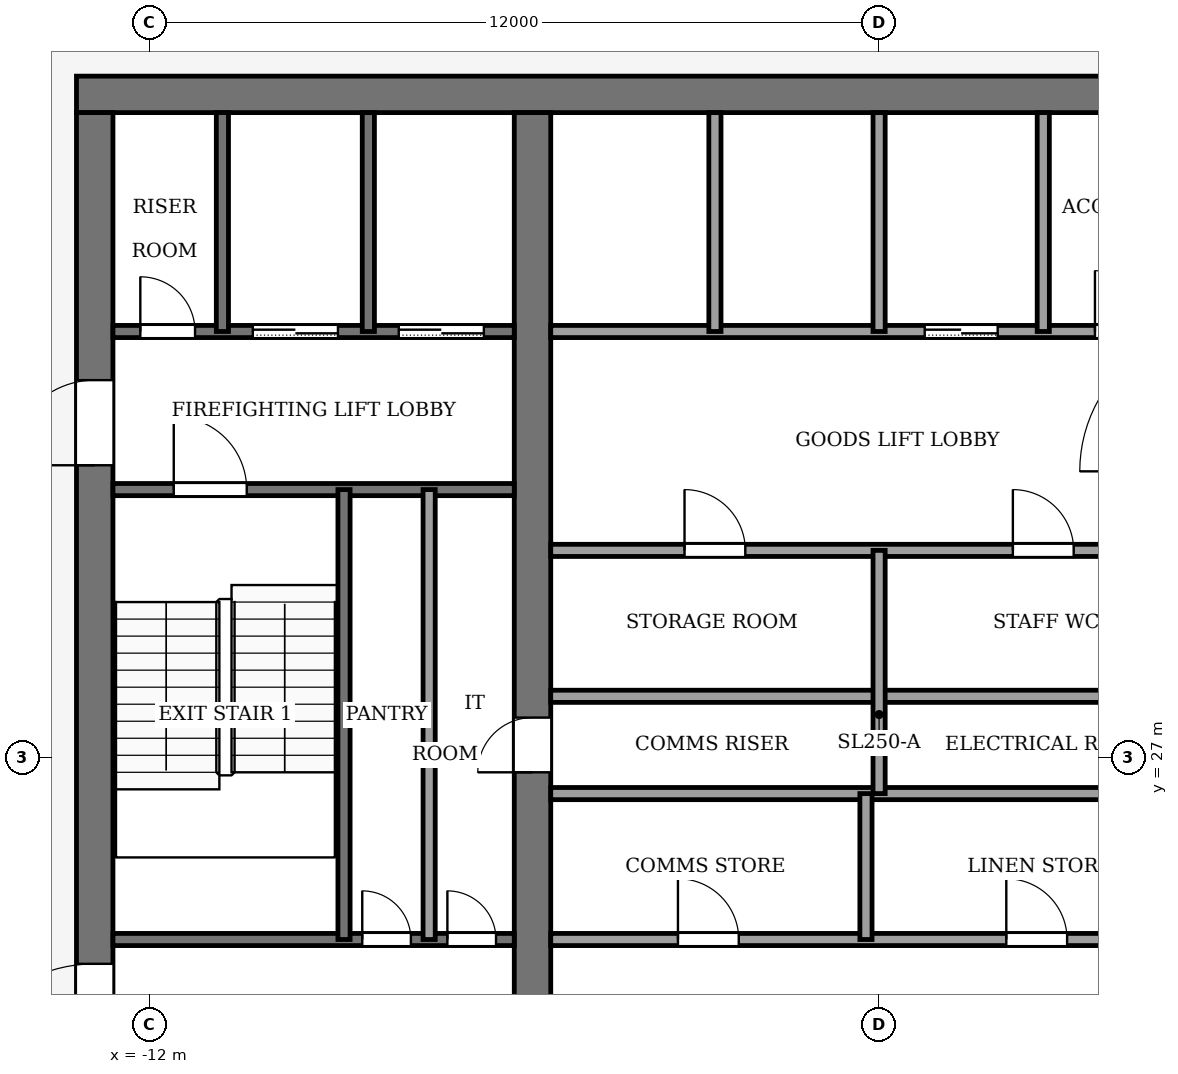
"""IFC4 building model, lengths in metres.
Left out: names, types, materials, properties, quantities, classifications, styles, units other than length and angle.
Written with IfcOpenShell. Run it as: python <this file> out.ifc"""

import sys

from ifc_helpers import new_model, si_unit, direction, frame, frame_2d, origin, place, context, subcontext, project, spatial, rectangle, extrude, element, fill, save


model = new_model("IFC4")
c1 = context("Model", 3, precision=1e-05, world=origin(), true_north=direction((0.0, 1.0)))
c2 = subcontext(c1, "Body", "Model", "MODEL_VIEW")
j1 = project(units=[si_unit("LENGTHUNIT", "METRE"), si_unit("PLANEANGLEUNIT", "RADIAN")], contexts=[c1])
p1 = place(None, origin())
s1 = spatial("IfcSite", under=j1, at=p1, CompositionType="ELEMENT")
p2 = place(p1, origin())
s2 = spatial("IfcBuilding", under=s1, at=p2, CompositionType="ELEMENT")
p3 = place(p2, frame((0.0, 0.0, 298.0)))
s3 = spatial("IfcBuildingStorey", under=s2, at=p3, CompositionType="ELEMENT", Elevation=298.0)
p4 = place(p3, frame((-13.2, 37.9, -0.13), z_axis=(0.0, 0.0, 1.0), x_axis=(1.0, 0.0, 0.0)))
e1 = element("IfcWall", 1, at=p4, inside=s3, PredefinedType="SHEAR", context=c2, shape_type="SweptSolid", body=[
    extrude(rectangle(XDim=26.4, YDim=0.6, at=frame_2d((13.2, 0.0))), origin(), (0.0, 0.0, 1.0), 4.0),
])
p5 = place(p3, frame((-12.9, 18.4, -0.13), z_axis=(0.0, 0.0, 1.0), x_axis=(0.0, 1.0, 0.0)))
e2 = element("IfcWall", 2, at=p5, inside=s3, PredefinedType="SHEAR", context=c2, shape_type="SweptSolid", body=[
    extrude(rectangle(XDim=19.2, YDim=0.6, at=frame_2d((9.6, 0.0))), origin(), (0.0, 0.0, 1.0), 4.0),
])
p6 = place(p5, frame((2.8, 0.0, 0.13)))
e3 = element("IfcOpeningElement", 3, at=p6, cuts=e2, PredefinedType="OPENING", context=c2, shape_type="SweptSolid", body=[
    extrude(rectangle(XDim=2.4, YDim=2.4, at=frame_2d((1.2, 1.2))), frame((0.0, 0.31, 0.0), z_axis=(0.0, -1.0, 0.0), x_axis=(1.0, 0.0, 0.0)), (0.0, 0.0, 1.0), 0.62),
])
p7 = place(p5, frame((13.4, 0.0, 0.13)))
e4 = element("IfcOpeningElement", 4, at=p7, cuts=e2, PredefinedType="OPENING", context=c2, shape_type="SweptSolid", body=[
    extrude(rectangle(XDim=1.4, YDim=2.2, at=frame_2d((0.7, 1.1))), frame((0.0, 0.31, 0.0), z_axis=(0.0, -1.0, 0.0), x_axis=(1.0, 0.0, 0.0)), (0.0, 0.0, 1.0), 0.62),
])
p8 = place(p3, frame((-5.7, 18.4, -0.13), z_axis=(0.0, 0.0, 1.0), x_axis=(0.0, 1.0, 0.0)))
e5 = element("IfcWall", 5, at=p8, inside=s3, PredefinedType="SHEAR", context=c2, shape_type="SweptSolid", body=[
    extrude(rectangle(XDim=19.2, YDim=0.6, at=frame_2d((9.6, 0.0))), origin(), (0.0, 0.0, 1.0), 4.0),
])
p9 = place(p8, frame((8.35, 0.0, 0.13)))
e6 = element("IfcOpeningElement", 6, at=p9, cuts=e5, PredefinedType="OPENING", context=c2, shape_type="SweptSolid", body=[
    extrude(rectangle(XDim=0.9, YDim=2.1, at=frame_2d((0.45, 1.05))), frame((0.0, 0.31, 0.0), z_axis=(0.0, -1.0, 0.0), x_axis=(1.0, 0.0, 0.0)), (0.0, 0.0, 1.0), 0.62),
])
p10 = place(p3, frame((-12.6, 24.0, 0.0), z_axis=(0.0, 0.0, 1.0), x_axis=(1.0, 0.0, 0.0)))
e7 = element("IfcWall", 7, at=p10, inside=s3, PredefinedType="PARTITIONING", context=c2, shape_type="SweptSolid", body=[
    extrude(rectangle(XDim=6.6, YDim=0.2, at=frame_2d((3.3, 0.0))), origin(), (0.0, 0.0, 1.0), 3.87),
])
p11 = place(p10, frame((4.1, 0.0, 0.0)))
e8 = element("IfcOpeningElement", 8, at=p11, cuts=e7, PredefinedType="OPENING", context=c2, shape_type="SweptSolid", body=[
    extrude(rectangle(XDim=0.8, YDim=2.1, at=frame_2d((0.4, 1.05))), frame((0.0, 0.11, 0.0), z_axis=(0.0, -1.0, 0.0), x_axis=(1.0, 0.0, 0.0)), (0.0, 0.0, 1.0), 0.22),
])
p12 = place(p10, frame((5.5, 0.0, 0.0)))
e9 = element("IfcOpeningElement", 9, at=p12, cuts=e7, PredefinedType="OPENING", context=c2, shape_type="SweptSolid", body=[
    extrude(rectangle(XDim=0.8, YDim=2.1, at=frame_2d((0.4, 1.05))), frame((0.0, 0.11, 0.0), z_axis=(0.0, -1.0, 0.0), x_axis=(1.0, 0.0, 0.0)), (0.0, 0.0, 1.0), 0.22),
])
p13 = place(p3, frame((-5.4, 24.0, 0.0), z_axis=(0.0, 0.0, 1.0), x_axis=(1.0, 0.0, 0.0)))
e10 = element("IfcWall", 10, at=p13, inside=s3, PredefinedType="PARTITIONING", context=c2, shape_type="SweptSolid", body=[
    extrude(rectangle(XDim=10.8, YDim=0.2, at=frame_2d((5.4, 0.0))), origin(), (0.0, 0.0, 1.0), 3.87),
])
p14 = place(p13, frame((2.092, 0.0, 0.0)))
e11 = element("IfcOpeningElement", 11, at=p14, cuts=e10, PredefinedType="OPENING", context=c2, shape_type="SweptSolid", body=[
    extrude(rectangle(XDim=1.0, YDim=2.1, at=frame_2d((0.5, 1.05))), frame((0.0, 0.11, 0.0), z_axis=(0.0, -1.0, 0.0), x_axis=(1.0, 0.0, 0.0)), (0.0, 0.0, 1.0), 0.22),
])
p15 = place(p13, frame((7.492, 0.0, 0.0)))
e12 = element("IfcOpeningElement", 12, at=p15, cuts=e10, PredefinedType="OPENING", context=c2, shape_type="SweptSolid", body=[
    extrude(rectangle(XDim=1.0, YDim=2.1, at=frame_2d((0.5, 1.05))), frame((0.0, 0.11, 0.0), z_axis=(0.0, -1.0, 0.0), x_axis=(1.0, 0.0, 0.0)), (0.0, 0.0, 1.0), 0.22),
])
for number, where, z_axis, x_axis in (
    (13, (-5.4, 26.4, 0.0), (0.0, 0.0, 1.0), (1.0, 0.0, 0.0)),
    (14, (-5.4, 28.0, 0.0), (0.0, 0.0, 1.0), (1.0, 0.0, 0.0)),
):
    element("IfcWall", number, at=place(p3, frame(where, z_axis=z_axis, x_axis=x_axis)), inside=s3, PredefinedType="PARTITIONING", context=c2, shape_type="SweptSolid", body=[
        extrude(rectangle(XDim=10.8, YDim=0.2, at=frame_2d((5.4, 0.0))), origin(), (0.0, 0.0, 1.0), 3.87),
    ])
p16 = place(p3, frame((-5.4, 30.4, 0.0), z_axis=(0.0, 0.0, 1.0), x_axis=(1.0, 0.0, 0.0)))
e15 = element("IfcWall", 15, at=p16, inside=s3, PredefinedType="PARTITIONING", context=c2, shape_type="SweptSolid", body=[
    extrude(rectangle(XDim=10.8, YDim=0.2, at=frame_2d((5.4, 0.0))), origin(), (0.0, 0.0, 1.0), 3.87),
])
p17 = place(p16, frame((2.2, 0.0, 0.0)))
e16 = element("IfcOpeningElement", 16, at=p17, cuts=e15, PredefinedType="OPENING", context=c2, shape_type="SweptSolid", body=[
    extrude(rectangle(XDim=1.0, YDim=2.1, at=frame_2d((0.5, 1.05))), frame((0.0, 0.11, 0.0), z_axis=(0.0, -1.0, 0.0), x_axis=(1.0, 0.0, 0.0)), (0.0, 0.0, 1.0), 0.22),
])
p18 = place(p16, frame((7.6, 0.0, 0.0)))
e17 = element("IfcOpeningElement", 17, at=p18, cuts=e15, PredefinedType="OPENING", context=c2, shape_type="SweptSolid", body=[
    extrude(rectangle(XDim=1.0, YDim=2.1, at=frame_2d((0.5, 1.05))), frame((0.0, 0.11, 0.0), z_axis=(0.0, -1.0, 0.0), x_axis=(1.0, 0.0, 0.0)), (0.0, 0.0, 1.0), 0.22),
])
p19 = place(p3, frame((-12.6, 31.4, 0.0), z_axis=(0.0, 0.0, 1.0), x_axis=(1.0, 0.0, 0.0)))
e18 = element("IfcWall", 18, at=p19, inside=s3, PredefinedType="PARTITIONING", context=c2, shape_type="SweptSolid", body=[
    extrude(rectangle(XDim=6.6, YDim=0.2, at=frame_2d((3.3, 0.0))), origin(), (0.0, 0.0, 1.0), 3.87),
])
p20 = place(p19, frame((1.0, 0.0, 0.0)))
e19 = element("IfcOpeningElement", 19, at=p20, cuts=e18, PredefinedType="OPENING", context=c2, shape_type="SweptSolid", body=[
    extrude(rectangle(XDim=1.2, YDim=2.2, at=frame_2d((0.6, 1.1))), frame((0.0, 0.11, 0.0), z_axis=(0.0, -1.0, 0.0), x_axis=(1.0, 0.0, 0.0)), (0.0, 0.0, 1.0), 0.22),
])
p21 = place(p3, frame((-12.6, 34.0, 0.0), z_axis=(0.0, 0.0, 1.0), x_axis=(1.0, 0.0, 0.0)))
e20 = element("IfcWall", 20, at=p21, inside=s3, PredefinedType="PARTITIONING", context=c2, shape_type="SweptSolid", body=[
    extrude(rectangle(XDim=6.6, YDim=0.2, at=frame_2d((3.3, 0.0))), origin(), (0.0, 0.0, 1.0), 3.87),
])
p22 = place(p21, frame((4.7, 0.0, 0.0)))
e21 = element("IfcOpeningElement", 21, at=p22, cuts=e20, PredefinedType="OPENING", context=c2, shape_type="SweptSolid", body=[
    extrude(rectangle(XDim=1.4, YDim=2.2, at=frame_2d((0.7, 1.1))), frame((0.0, 0.11, 0.0), z_axis=(0.0, -1.0, 0.0), x_axis=(1.0, 0.0, 0.0)), (0.0, 0.0, 1.0), 0.22),
])
p23 = place(p21, frame((2.3, 0.0, 0.0)))
e22 = element("IfcOpeningElement", 22, at=p23, cuts=e20, PredefinedType="OPENING", context=c2, shape_type="SweptSolid", body=[
    extrude(rectangle(XDim=1.4, YDim=2.2, at=frame_2d((0.7, 1.1))), frame((0.0, 0.11, 0.0), z_axis=(0.0, -1.0, 0.0), x_axis=(1.0, 0.0, 0.0)), (0.0, 0.0, 1.0), 0.22),
])
p24 = place(p21, frame((0.45, 0.0, 0.0)))
e23 = element("IfcOpeningElement", 23, at=p24, cuts=e20, PredefinedType="OPENING", context=c2, shape_type="SweptSolid", body=[
    extrude(rectangle(XDim=0.9, YDim=2.1, at=frame_2d((0.45, 1.05))), frame((0.0, 0.11, 0.0), z_axis=(0.0, -1.0, 0.0), x_axis=(1.0, 0.0, 0.0)), (0.0, 0.0, 1.0), 0.22),
])
p25 = place(p3, frame((-5.4, 34.0, 0.0), z_axis=(0.0, 0.0, 1.0), x_axis=(1.0, 0.0, 0.0)))
e24 = element("IfcWall", 24, at=p25, inside=s3, PredefinedType="PARTITIONING", context=c2, shape_type="SweptSolid", body=[
    extrude(rectangle(XDim=10.8, YDim=0.2, at=frame_2d((5.4, 0.0))), origin(), (0.0, 0.0, 1.0), 3.87),
])
p26 = place(p25, frame((6.15, 0.0, 0.0)))
e25 = element("IfcOpeningElement", 25, at=p26, cuts=e24, PredefinedType="OPENING", context=c2, shape_type="SweptSolid", body=[
    extrude(rectangle(XDim=1.2, YDim=2.2, at=frame_2d((0.6, 1.1))), frame((0.0, 0.11, 0.0), z_axis=(0.0, -1.0, 0.0), x_axis=(1.0, 0.0, 0.0)), (0.0, 0.0, 1.0), 0.22),
])
p27 = place(p25, frame((8.95, 0.0, 0.0)))
e26 = element("IfcOpeningElement", 26, at=p27, cuts=e24, PredefinedType="OPENING", context=c2, shape_type="SweptSolid", body=[
    extrude(rectangle(XDim=1.0, YDim=2.1, at=frame_2d((0.5, 1.05))), frame((0.0, 0.11, 0.0), z_axis=(0.0, -1.0, 0.0), x_axis=(1.0, 0.0, 0.0)), (0.0, 0.0, 1.0), 0.22),
])
p28 = place(p3, frame((-10.8, 34.0, 0.0), z_axis=(0.0, 0.0, 1.0), x_axis=(0.0, 1.0, 0.0)))
e27 = element("IfcWall", 27, at=p28, inside=s3, PredefinedType="PARTITIONING", context=c2, shape_type="SweptSolid", body=[
    extrude(rectangle(XDim=3.6, YDim=0.2, at=frame_2d((1.8, 0.0))), origin(), (0.0, 0.0, 1.0), 3.87),
])
p29 = place(p3, frame((-8.8, 24.0, 0.0), z_axis=(0.0, 0.0, 1.0), x_axis=(0.0, 1.0, 0.0)))
e28 = element("IfcWall", 28, at=p29, inside=s3, PredefinedType="PARTITIONING", context=c2, shape_type="SweptSolid", body=[
    extrude(rectangle(XDim=7.4, YDim=0.2, at=frame_2d((3.7, 0.0))), origin(), (0.0, 0.0, 1.0), 3.87),
])
p30 = place(p3, frame((-8.4, 34.0, 0.0), z_axis=(0.0, 0.0, 1.0), x_axis=(0.0, 1.0, 0.0)))
e29 = element("IfcWall", 29, at=p30, inside=s3, PredefinedType="PARTITIONING", context=c2, shape_type="SweptSolid", body=[
    extrude(rectangle(XDim=3.6, YDim=0.2, at=frame_2d((1.8, 0.0))), origin(), (0.0, 0.0, 1.0), 3.87),
])
p31 = place(p3, frame((-7.4, 24.0, 0.0), z_axis=(0.0, 0.0, 1.0), x_axis=(0.0, 1.0, 0.0)))
e30 = element("IfcWall", 30, at=p31, inside=s3, PredefinedType="PARTITIONING", context=c2, shape_type="SweptSolid", body=[
    extrude(rectangle(XDim=7.4, YDim=0.2, at=frame_2d((3.7, 0.0))), origin(), (0.0, 0.0, 1.0), 3.87),
])
p32 = place(p3, frame((-2.7, 34.0, 0.0), z_axis=(0.0, 0.0, 1.0), x_axis=(0.0, 1.0, 0.0)))
e31 = element("IfcWall", 31, at=p32, inside=s3, PredefinedType="PARTITIONING", context=c2, shape_type="SweptSolid", body=[
    extrude(rectangle(XDim=3.6, YDim=0.2, at=frame_2d((1.8, 0.0))), origin(), (0.0, 0.0, 1.0), 3.87),
])
p33 = place(p3, frame((-0.216, 24.0, 0.0), z_axis=(0.0, 0.0, 1.0), x_axis=(0.0, 1.0, 0.0)))
e32 = element("IfcWall", 32, at=p33, inside=s3, PredefinedType="PARTITIONING", context=c2, shape_type="SweptSolid", body=[
    extrude(rectangle(XDim=2.4, YDim=0.2, at=frame_2d((1.2, 0.0))), origin(), (0.0, 0.0, 1.0), 3.87),
])
p34 = place(p3, frame((0.0, 26.4, 0.0), z_axis=(0.0, 0.0, 1.0), x_axis=(0.0, 1.0, 0.0)))
e33 = element("IfcWall", 33, at=p34, inside=s3, PredefinedType="PARTITIONING", context=c2, shape_type="SweptSolid", body=[
    extrude(rectangle(XDim=4.0, YDim=0.2, at=frame_2d((2.0, 0.0))), origin(), (0.0, 0.0, 1.0), 3.87),
])
for number, where, z_axis, x_axis in (
    (34, (0.0, 34.0, 0.0), (0.0, 0.0, 1.0), (0.0, 1.0, 0.0)),
    (35, (2.7, 34.0, 0.0), (0.0, 0.0, 1.0), (0.0, 1.0, 0.0)),
):
    element("IfcWall", number, at=place(p3, frame(where, z_axis=z_axis, x_axis=x_axis)), inside=s3, PredefinedType="PARTITIONING", context=c2, shape_type="SweptSolid", body=[
        extrude(rectangle(XDim=3.6, YDim=0.2, at=frame_2d((1.8, 0.0))), origin(), (0.0, 0.0, 1.0), 3.87),
    ])
p35 = place(p26, origin())
e36 = element("IfcDoor", 36, at=p35, inside=s3, OperationType="SLIDING_TO_LEFT", PredefinedType="DOOR", context=c2, shape_type="SweptSolid", body=[
    extrude(rectangle(XDim=1.2, YDim=2.2, at=frame_2d((0.6, 1.1))), frame((0.0, 0.025, 0.0), z_axis=(0.0, -1.0, 0.0), x_axis=(1.0, 0.0, 0.0)), (0.0, 0.0, 1.0), 0.05),
])
fill(e25, e36)
p36 = place(p22, origin())
e37 = element("IfcDoor", 37, at=p36, inside=s3, OperationType="SLIDING_TO_LEFT", PredefinedType="DOOR", context=c2, shape_type="SweptSolid", body=[
    extrude(rectangle(XDim=1.4, YDim=2.2, at=frame_2d((0.7, 1.1))), frame((0.0, 0.025, 0.0), z_axis=(0.0, -1.0, 0.0), x_axis=(1.0, 0.0, 0.0)), (0.0, 0.0, 1.0), 0.05),
])
fill(e21, e37)
p37 = place(p23, origin())
e38 = element("IfcDoor", 38, at=p37, inside=s3, OperationType="SLIDING_TO_LEFT", PredefinedType="DOOR", context=c2, shape_type="SweptSolid", body=[
    extrude(rectangle(XDim=1.4, YDim=2.2, at=frame_2d((0.7, 1.1))), frame((0.0, 0.025, 0.0), z_axis=(0.0, -1.0, 0.0), x_axis=(1.0, 0.0, 0.0)), (0.0, 0.0, 1.0), 0.05),
])
fill(e22, e38)
p38 = place(p24, origin())
e39 = element("IfcDoor", 39, at=p38, inside=s3, OperationType="SINGLE_SWING_RIGHT", PredefinedType="DOOR", context=c2, shape_type="SweptSolid", body=[
    extrude(rectangle(XDim=0.9, YDim=2.1, at=frame_2d((0.45, 1.05))), frame((0.0, 0.025, 0.0), z_axis=(0.0, -1.0, 0.0), x_axis=(1.0, 0.0, 0.0)), (0.0, 0.0, 1.0), 0.05),
])
fill(e23, e39)
p39 = place(p14, origin())
e40 = element("IfcDoor", 40, at=p39, inside=s3, OperationType="SINGLE_SWING_RIGHT", PredefinedType="DOOR", context=c2, shape_type="SweptSolid", body=[
    extrude(rectangle(XDim=1.0, YDim=2.1, at=frame_2d((0.5, 1.05))), frame((0.0, 0.025, 0.0), z_axis=(0.0, -1.0, 0.0), x_axis=(1.0, 0.0, 0.0)), (0.0, 0.0, 1.0), 0.05),
])
fill(e11, e40)
p40 = place(p15, origin())
e41 = element("IfcDoor", 41, at=p40, inside=s3, OperationType="SINGLE_SWING_LEFT", PredefinedType="DOOR", context=c2, shape_type="SweptSolid", body=[
    extrude(rectangle(XDim=1.0, YDim=2.1, at=frame_2d((0.5, 1.05))), frame((0.0, 0.025, 0.0), z_axis=(0.0, -1.0, 0.0), x_axis=(1.0, 0.0, 0.0)), (0.0, 0.0, 1.0), 0.05),
])
fill(e12, e41)
p41 = place(p17, origin())
e42 = element("IfcDoor", 42, at=p41, inside=s3, OperationType="SINGLE_SWING_LEFT", PredefinedType="DOOR", context=c2, shape_type="SweptSolid", body=[
    extrude(rectangle(XDim=1.0, YDim=2.1, at=frame_2d((0.5, 1.05))), frame((0.0, 0.025, 0.0), z_axis=(0.0, -1.0, 0.0), x_axis=(1.0, 0.0, 0.0)), (0.0, 0.0, 1.0), 0.05),
])
fill(e16, e42)
p42 = place(p18, origin())
e43 = element("IfcDoor", 43, at=p42, inside=s3, OperationType="SINGLE_SWING_RIGHT", PredefinedType="DOOR", context=c2, shape_type="SweptSolid", body=[
    extrude(rectangle(XDim=1.0, YDim=2.1, at=frame_2d((0.5, 1.05))), frame((0.0, 0.025, 0.0), z_axis=(0.0, -1.0, 0.0), x_axis=(1.0, 0.0, 0.0)), (0.0, 0.0, 1.0), 0.05),
])
fill(e17, e43)
p43 = place(p11, origin())
e44 = element("IfcDoor", 44, at=p43, inside=s3, OperationType="SINGLE_SWING_RIGHT", PredefinedType="DOOR", context=c2, shape_type="SweptSolid", body=[
    extrude(rectangle(XDim=0.8, YDim=2.1, at=frame_2d((0.4, 1.05))), frame((0.0, 0.025, 0.0), z_axis=(0.0, -1.0, 0.0), x_axis=(1.0, 0.0, 0.0)), (0.0, 0.0, 1.0), 0.05),
])
fill(e8, e44)
p44 = place(p12, origin())
e45 = element("IfcDoor", 45, at=p44, inside=s3, OperationType="SINGLE_SWING_LEFT", PredefinedType="DOOR", context=c2, shape_type="SweptSolid", body=[
    extrude(rectangle(XDim=0.8, YDim=2.1, at=frame_2d((0.4, 1.05))), frame((0.0, 0.025, 0.0), z_axis=(0.0, -1.0, 0.0), x_axis=(1.0, 0.0, 0.0)), (0.0, 0.0, 1.0), 0.05),
])
fill(e9, e45)
p45 = place(p27, origin())
e46 = element("IfcDoor", 46, at=p45, inside=s3, OperationType="SINGLE_SWING_LEFT", PredefinedType="DOOR", context=c2, shape_type="SweptSolid", body=[
    extrude(rectangle(XDim=1.0, YDim=2.1, at=frame_2d((0.5, 1.05))), frame((0.0, 0.025, 0.0), z_axis=(0.0, -1.0, 0.0), x_axis=(1.0, 0.0, 0.0)), (0.0, 0.0, 1.0), 0.05),
])
fill(e26, e46)
p46 = place(p9, origin())
e47 = element("IfcDoor", 47, at=p46, inside=s3, OperationType="SINGLE_SWING_LEFT", PredefinedType="DOOR", context=c2, shape_type="SweptSolid", body=[
    extrude(rectangle(XDim=0.9, YDim=2.1, at=frame_2d((0.45, 1.05))), frame((0.0, 0.025, 0.0), z_axis=(0.0, -1.0, 0.0), x_axis=(1.0, 0.0, 0.0)), (0.0, 0.0, 1.0), 0.05),
])
fill(e6, e47)
p47 = place(p20, origin())
e48 = element("IfcDoor", 48, at=p47, inside=s3, OperationType="SINGLE_SWING_RIGHT", PredefinedType="DOOR", context=c2, shape_type="SweptSolid", body=[
    extrude(rectangle(XDim=1.2, YDim=2.2, at=frame_2d((0.6, 1.1))), frame((0.0, 0.025, 0.0), z_axis=(0.0, -1.0, 0.0), x_axis=(1.0, 0.0, 0.0)), (0.0, 0.0, 1.0), 0.05),
])
fill(e19, e48)
p48 = place(p6, origin())
e49 = element("IfcDoor", 49, at=p48, inside=s3, OperationType="DOUBLE_DOOR_SINGLE_SWING", PredefinedType="DOOR", context=c2, shape_type="SweptSolid", body=[
    extrude(rectangle(XDim=2.4, YDim=2.4, at=frame_2d((1.2, 1.2))), frame((0.0, 0.025, 0.0), z_axis=(0.0, -1.0, 0.0), x_axis=(1.0, 0.0, 0.0)), (0.0, 0.0, 1.0), 0.05),
])
fill(e3, e49)
p49 = place(p7, origin())
e50 = element("IfcDoor", 50, at=p49, inside=s3, OperationType="SINGLE_SWING_RIGHT", PredefinedType="DOOR", context=c2, shape_type="SweptSolid", body=[
    extrude(rectangle(XDim=1.4, YDim=2.2, at=frame_2d((0.7, 1.1))), frame((0.0, 0.025, 0.0), z_axis=(0.0, -1.0, 0.0), x_axis=(1.0, 0.0, 0.0)), (0.0, 0.0, 1.0), 0.05),
])
fill(e4, e50)
save(model, sys.argv[1])
